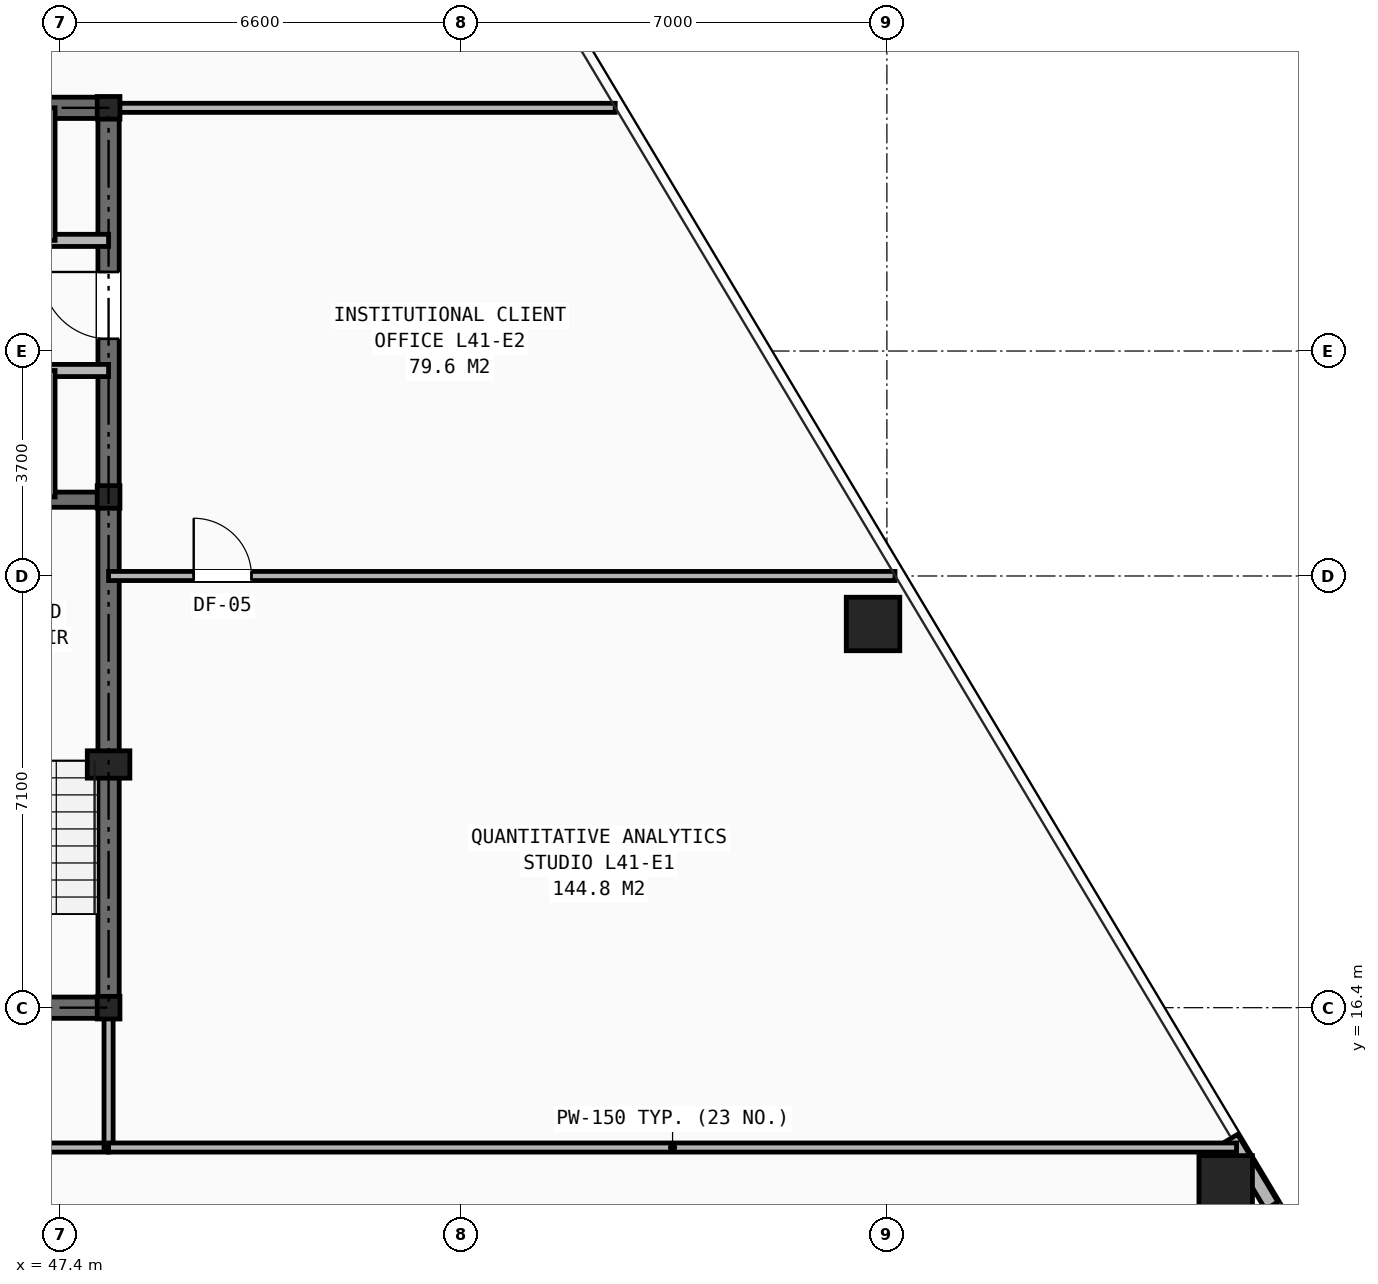
"""IFC4 building model, lengths in metres.
Left out: names, types, materials, properties, quantities, classifications, styles, units other than length and angle.
Written with IfcOpenShell. Run it as: python <this file> out.ifc"""

import sys

from ifc_helpers import new_model, si_unit, direction, frame, frame_2d, origin, origin_2d, place, context, subcontext, project, spatial, rectangle, hollow_rectangle, i_section, extrude, element, fill, save


model = new_model("IFC4")
c1 = context("Model", 3, precision=1e-05, world=origin(), true_north=direction((0.0, 1.0)))
c2 = subcontext(c1, "Body", "Model", "MODEL_VIEW")
j1 = project(units=[si_unit("LENGTHUNIT", "METRE"), si_unit("PLANEANGLEUNIT", "RADIAN")], contexts=[c1])
p1 = place(None, origin())
s1 = spatial("IfcSite", under=j1, at=p1, CompositionType="ELEMENT")
p2 = place(p1, origin())
s2 = spatial("IfcBuilding", under=s1, at=p2, CompositionType="ELEMENT")
p3 = place(p2, frame((0.0, 0.0, 143.6)))
s3 = spatial("IfcBuildingStorey", under=s2, at=p3, CompositionType="ELEMENT", Elevation=143.6)
for number, where, z_axis, x_axis in (
    (1, (48.2, 16.4, 0.0), (0.0, 0.0, 1.0), (1.0, 0.0, 0.0)),
    (2, (48.2, 24.8, 0.0), (0.0, 0.0, 1.0), (1.0, 0.0, 0.0)),
    (3, (48.2, 31.2, 0.0), (0.0, 0.0, 1.0), (1.0, 0.0, 0.0)),
):
    element("IfcColumn", number, at=place(p3, frame(where, z_axis=z_axis, x_axis=x_axis)), inside=s3, PredefinedType="COLUMN", context=c2, shape_type="SweptSolid", body=[
        extrude(i_section(OverallWidth=0.374, OverallDepth=0.372, WebThickness=0.016, FlangeThickness=0.026, at=origin_2d()), origin(), (0.0, 0.0, 1.0), 3.45),
    ])
p4 = place(p3, frame((48.2, 20.4, 0.0), z_axis=(0.0, 0.0, 1.0), x_axis=(1.0, 0.0, 0.0)))
e4 = element("IfcColumn", 4, at=p4, inside=s3, PredefinedType="PILASTER", context=c2, shape_type="SweptSolid", body=[
    extrude(rectangle(XDim=0.7, YDim=0.45, at=origin_2d()), origin(), (0.0, 0.0, 1.0), 3.45),
])
for number, where, z_axis, x_axis in (
    (5, (66.572, 13.527, 0.0), (0.0, 0.0, 1.0), (1.0, 0.0, 0.0)),
    (6, (60.772, 22.711, 0.0), (0.0, 0.0, 1.0), (1.0, 0.0, 0.0)),
):
    element("IfcColumn", number, at=place(p3, frame(where, z_axis=z_axis, x_axis=x_axis)), inside=s3, PredefinedType="COLUMN", context=c2, shape_type="SweptSolid", body=[
        extrude(hollow_rectangle(XDim=0.88, YDim=0.88, WallThickness=0.06, at=origin_2d()), origin(), (0.0, 0.0, 1.0), 3.45),
    ])
p5 = place(p3, frame((67.328, 13.143, 0.0), z_axis=(0.0, 0.0, 1.0), x_axis=(-0.513024934393, 0.858373704567, 0.0)))
e7 = element("IfcWall", 7, at=p5, inside=s3, PredefinedType="SHEAR", context=c2, shape_type="SweptSolid", body=[
    extrude(rectangle(XDim=1.294, YDim=0.24, at=frame_2d((0.647, 0.0))), origin(), (0.0, 0.0, 1.0), 2.583),
])
p6 = place(p3, frame((31.8, 16.4, 0.0), z_axis=(0.0, 0.0, 1.0), x_axis=(1.0, 0.0, 0.0)))
e8 = element("IfcWall", 8, at=p6, inside=s3, PredefinedType="SHEAR", context=c2, shape_type="SweptSolid", body=[
    extrude(rectangle(XDim=16.4, YDim=0.35, at=frame_2d((8.2, 0.0))), origin(), (0.0, 0.0, 1.0), 3.21),
])
p7 = place(p6, frame((7.75, 0.0, 0.0)))
e9 = element("IfcOpeningElement", 9, at=p7, cuts=e8, PredefinedType="OPENING", context=c2, shape_type="SweptSolid", body=[
    extrude(rectangle(XDim=0.9, YDim=2.1, at=frame_2d((0.45, 1.05))), frame((0.0, 0.185, 0.0), z_axis=(0.0, -1.0, 0.0), x_axis=(1.0, 0.0, 0.0)), (0.0, 0.0, 1.0), 0.37),
])
p8 = place(p6, frame((4.2, 0.0, 0.0)))
e10 = element("IfcOpeningElement", 10, at=p8, cuts=e8, PredefinedType="OPENING", context=c2, shape_type="SweptSolid", body=[
    extrude(rectangle(XDim=0.95, YDim=2.1, at=frame_2d((0.475, 1.05))), frame((0.0, 0.185, 0.0), z_axis=(0.0, -1.0, 0.0), x_axis=(1.0, 0.0, 0.0)), (0.0, 0.0, 1.0), 0.37),
])
p9 = place(p6, frame((10.6, 0.0, 0.0)))
e11 = element("IfcOpeningElement", 11, at=p9, cuts=e8, PredefinedType="OPENING", context=c2, shape_type="SweptSolid", body=[
    extrude(rectangle(XDim=0.95, YDim=2.1, at=frame_2d((0.475, 1.05))), frame((0.0, 0.185, 0.0), z_axis=(0.0, -1.0, 0.0), x_axis=(1.0, 0.0, 0.0)), (0.0, 0.0, 1.0), 0.37),
])
p10 = place(p3, frame((31.8, 31.2, 0.0), z_axis=(0.0, 0.0, 1.0), x_axis=(1.0, 0.0, 0.0)))
e12 = element("IfcWall", 12, at=p10, inside=s3, PredefinedType="SHEAR", context=c2, shape_type="SweptSolid", body=[
    extrude(rectangle(XDim=16.4, YDim=0.35, at=frame_2d((8.2, 0.0))), origin(), (0.0, 0.0, 1.0), 3.21),
])
p11 = place(p3, frame((48.2, 16.4, 0.0), z_axis=(0.0, 0.0, 1.0), x_axis=(0.0, 1.0, 0.0)))
e13 = element("IfcWall", 13, at=p11, inside=s3, PredefinedType="SHEAR", context=c2, shape_type="SweptSolid", body=[
    extrude(rectangle(XDim=14.8, YDim=0.35, at=frame_2d((7.4, 0.0))), origin(), (0.0, 0.0, 1.0), 3.21),
])
p12 = place(p11, frame((11.0, 0.0, 0.0)))
e14 = element("IfcOpeningElement", 14, at=p12, cuts=e13, PredefinedType="OPENING", context=c2, shape_type="SweptSolid", body=[
    extrude(rectangle(XDim=1.1, YDim=2.15, at=frame_2d((0.55, 1.075))), frame((0.0, 0.185, 0.0), z_axis=(0.0, -1.0, 0.0), x_axis=(1.0, 0.0, 0.0)), (0.0, 0.0, 1.0), 0.37),
])
p13 = place(p3, frame((44.955, 24.755, 0.0), z_axis=(0.0, 0.0, 1.0), x_axis=(1.0, 0.0, 0.0)))
e15 = element("IfcWall", 15, at=p13, inside=s3, PredefinedType="SHEAR", context=c2, shape_type="SweptSolid", body=[
    extrude(rectangle(XDim=3.245, YDim=0.25, at=frame_2d((1.623, 0.0))), origin(), (0.0, 0.0, 1.0), 3.21),
])
p14 = place(p3, frame((33.82, 29.02, 0.0), z_axis=(0.0, 0.0, 1.0), x_axis=(1.0, 0.0, 0.0)))
e16 = element("IfcWall", 16, at=p14, inside=s3, PredefinedType="SOLIDWALL", context=c2, shape_type="SweptSolid", body=[
    extrude(rectangle(XDim=14.38, YDim=0.2, at=frame_2d((7.19, 0.0))), origin(), (0.0, 0.0, 1.0), 2.661),
])
p15 = place(p14, frame((1.78, 0.0, 0.0)))
e17 = element("IfcOpeningElement", 17, at=p15, cuts=e16, PredefinedType="OPENING", context=c2, shape_type="SweptSolid", body=[
    extrude(rectangle(XDim=0.9, YDim=2.1, at=frame_2d((0.45, 1.05))), frame((0.0, 0.11, 0.0), z_axis=(0.0, -1.0, 0.0), x_axis=(1.0, 0.0, 0.0)), (0.0, 0.0, 1.0), 0.22),
])
p16 = place(p14, frame((6.07, 0.0, 0.0)))
e18 = element("IfcOpeningElement", 18, at=p16, cuts=e16, PredefinedType="OPENING", context=c2, shape_type="SweptSolid", body=[
    extrude(rectangle(XDim=0.9, YDim=2.1, at=frame_2d((0.45, 1.05))), frame((0.0, 0.11, 0.0), z_axis=(0.0, -1.0, 0.0), x_axis=(1.0, 0.0, 0.0)), (0.0, 0.0, 1.0), 0.22),
])
p17 = place(p3, frame((31.8, 26.88, 0.0), z_axis=(0.0, 0.0, 1.0), x_axis=(1.0, 0.0, 0.0)))
e19 = element("IfcWall", 19, at=p17, inside=s3, PredefinedType="SOLIDWALL", context=c2, shape_type="SweptSolid", body=[
    extrude(rectangle(XDim=16.4, YDim=0.2, at=frame_2d((8.2, 0.0))), origin(), (0.0, 0.0, 1.0), 2.661),
])
p18 = place(p17, frame((0.55, 0.0, 0.0)))
e20 = element("IfcOpeningElement", 20, at=p18, cuts=e19, PredefinedType="OPENING", context=c2, shape_type="SweptSolid", body=[
    extrude(rectangle(XDim=0.85, YDim=2.05, at=frame_2d((0.425, 1.025))), frame((0.0, 0.11, 0.0), z_axis=(0.0, -1.0, 0.0), x_axis=(1.0, 0.0, 0.0)), (0.0, 0.0, 1.0), 0.22),
])
p19 = place(p17, frame((2.55, 0.0, 0.0)))
e21 = element("IfcOpeningElement", 21, at=p19, cuts=e19, PredefinedType="OPENING", context=c2, shape_type="SweptSolid", body=[
    extrude(rectangle(XDim=1.1, YDim=2.15, at=frame_2d((0.55, 1.075))), frame((0.0, 0.11, 0.0), z_axis=(0.0, -1.0, 0.0), x_axis=(1.0, 0.0, 0.0)), (0.0, 0.0, 1.0), 0.22),
])
p20 = place(p17, frame((4.71, 0.0, 0.0)))
e22 = element("IfcOpeningElement", 22, at=p20, cuts=e19, PredefinedType="OPENING", context=c2, shape_type="SweptSolid", body=[
    extrude(rectangle(XDim=1.1, YDim=2.15, at=frame_2d((0.55, 1.075))), frame((0.0, 0.11, 0.0), z_axis=(0.0, -1.0, 0.0), x_axis=(1.0, 0.0, 0.0)), (0.0, 0.0, 1.0), 0.22),
])
p21 = place(p17, frame((6.87, 0.0, 0.0)))
e23 = element("IfcOpeningElement", 23, at=p21, cuts=e19, PredefinedType="OPENING", context=c2, shape_type="SweptSolid", body=[
    extrude(rectangle(XDim=1.1, YDim=2.15, at=frame_2d((0.55, 1.075))), frame((0.0, 0.11, 0.0), z_axis=(0.0, -1.0, 0.0), x_axis=(1.0, 0.0, 0.0)), (0.0, 0.0, 1.0), 0.22),
])
p22 = place(p17, frame((9.03, 0.0, 0.0)))
e24 = element("IfcOpeningElement", 24, at=p22, cuts=e19, PredefinedType="OPENING", context=c2, shape_type="SweptSolid", body=[
    extrude(rectangle(XDim=1.1, YDim=2.15, at=frame_2d((0.55, 1.075))), frame((0.0, 0.11, 0.0), z_axis=(0.0, -1.0, 0.0), x_axis=(1.0, 0.0, 0.0)), (0.0, 0.0, 1.0), 0.22),
])
p23 = place(p3, frame((47.24, 29.02, 0.0), z_axis=(0.0, 0.0, 1.0), x_axis=(0.0, 1.0, 0.0)))
e25 = element("IfcWall", 25, at=p23, inside=s3, PredefinedType="SOLIDWALL", context=c2, shape_type="SweptSolid", body=[
    extrude(rectangle(XDim=2.18, YDim=0.16, at=frame_2d((1.09, 0.0))), origin(), (0.0, 0.0, 1.0), 2.661),
])
p24 = place(p3, frame((47.24, 24.8, 0.0), z_axis=(0.0, 0.0, 1.0), x_axis=(0.0, 1.0, 0.0)))
e26 = element("IfcWall", 26, at=p24, inside=s3, PredefinedType="SOLIDWALL", context=c2, shape_type="SweptSolid", body=[
    extrude(rectangle(XDim=2.08, YDim=0.16, at=frame_2d((1.04, 0.0))), origin(), (0.0, 0.0, 1.0), 3.21),
])
p25 = place(p3, frame((29.6, 14.1, 0.0), z_axis=(0.0, 0.0, 1.0), x_axis=(1.0, 0.0, 0.0)))
e27 = element("IfcWall", 27, at=p25, inside=s3, PredefinedType="PARTITIONING", context=c2, shape_type="SweptSolid", body=[
    extrude(rectangle(XDim=18.6, YDim=0.15, at=frame_2d((9.3, 0.0))), origin(), (0.0, 0.0, 1.0), 2.252),
])
p26 = place(p25, frame((0.55, 0.0, 0.0)))
e28 = element("IfcOpeningElement", 28, at=p26, cuts=e27, PredefinedType="OPENING", context=c2, shape_type="SweptSolid", body=[
    extrude(rectangle(XDim=0.95, YDim=2.1, at=frame_2d((0.475, 1.05))), frame((0.0, 0.085, 0.0), z_axis=(0.0, -1.0, 0.0), x_axis=(1.0, 0.0, 0.0)), (0.0, 0.0, 1.0), 0.17),
])
p27 = place(p3, frame((48.2, 14.1, 0.0), z_axis=(0.0, 0.0, 1.0), x_axis=(0.0, 1.0, 0.0)))
e29 = element("IfcWall", 29, at=p27, inside=s3, PredefinedType="PARTITIONING", context=c2, shape_type="SweptSolid", body=[
    extrude(rectangle(XDim=2.3, YDim=0.15, at=frame_2d((1.15, 0.0))), origin(), (0.0, 0.0, 1.0), 2.661),
])
p28 = place(p3, frame((48.2, 31.2, 0.0), z_axis=(0.0, 0.0, 1.0), x_axis=(1.0, 0.0, 0.0)))
e30 = element("IfcWall", 30, at=p28, inside=s3, PredefinedType="PARTITIONING", context=c2, shape_type="SweptSolid", body=[
    extrude(rectangle(XDim=8.332, YDim=0.15, at=frame_2d((4.166, 0.0))), origin(), (0.0, 0.0, 1.0), 2.252),
])
p29 = place(p3, frame((48.2, 14.1, 0.0), z_axis=(0.0, 0.0, 1.0), x_axis=(1.0, 0.0, 0.0)))
e31 = element("IfcWall", 31, at=p29, inside=s3, PredefinedType="PARTITIONING", context=c2, shape_type="SweptSolid", body=[
    extrude(rectangle(XDim=18.551, YDim=0.15, at=frame_2d((9.275, 0.0))), origin(), (0.0, 0.0, 1.0), 2.589),
])
p30 = place(p3, frame((48.2, 23.5, 0.0), z_axis=(0.0, 0.0, 1.0), x_axis=(1.0, 0.0, 0.0)))
e32 = element("IfcWall", 32, at=p30, inside=s3, PredefinedType="PARTITIONING", context=c2, shape_type="SweptSolid", body=[
    extrude(rectangle(XDim=12.933, YDim=0.15, at=frame_2d((6.467, 0.0))), origin(), (0.0, 0.0, 1.0), 2.589),
])
p31 = place(p30, frame((1.4, 0.0, 0.0)))
e33 = element("IfcOpeningElement", 33, at=p31, cuts=e32, PredefinedType="OPENING", context=c2, shape_type="SweptSolid", body=[
    extrude(rectangle(XDim=0.95, YDim=2.1, at=frame_2d((0.475, 1.05))), frame((0.0, 0.085, 0.0), z_axis=(0.0, -1.0, 0.0), x_axis=(1.0, 0.0, 0.0)), (0.0, 0.0, 1.0), 0.17),
])
p32 = place(p12, origin())
e34 = element("IfcDoor", 34, at=p32, inside=s3, OperationType="SINGLE_SWING_RIGHT", PredefinedType="DOOR", context=c2, shape_type="SweptSolid", body=[
    extrude(rectangle(XDim=1.1, YDim=2.15, at=frame_2d((0.55, 1.075))), frame((0.0, 0.025, 0.0), z_axis=(0.0, -1.0, 0.0), x_axis=(1.0, 0.0, 0.0)), (0.0, 0.0, 1.0), 0.05),
])
fill(e14, e34)
p33 = place(p31, origin())
e35 = element("IfcDoor", 35, at=p33, inside=s3, OperationType="SINGLE_SWING_LEFT", PredefinedType="DOOR", context=c2, shape_type="SweptSolid", body=[
    extrude(rectangle(XDim=0.95, YDim=2.1, at=frame_2d((0.475, 1.05))), frame((0.0, 0.025, 0.0), z_axis=(0.0, -1.0, 0.0), x_axis=(1.0, 0.0, 0.0)), (0.0, 0.0, 1.0), 0.05),
])
fill(e33, e35)
save(model, sys.argv[1])
